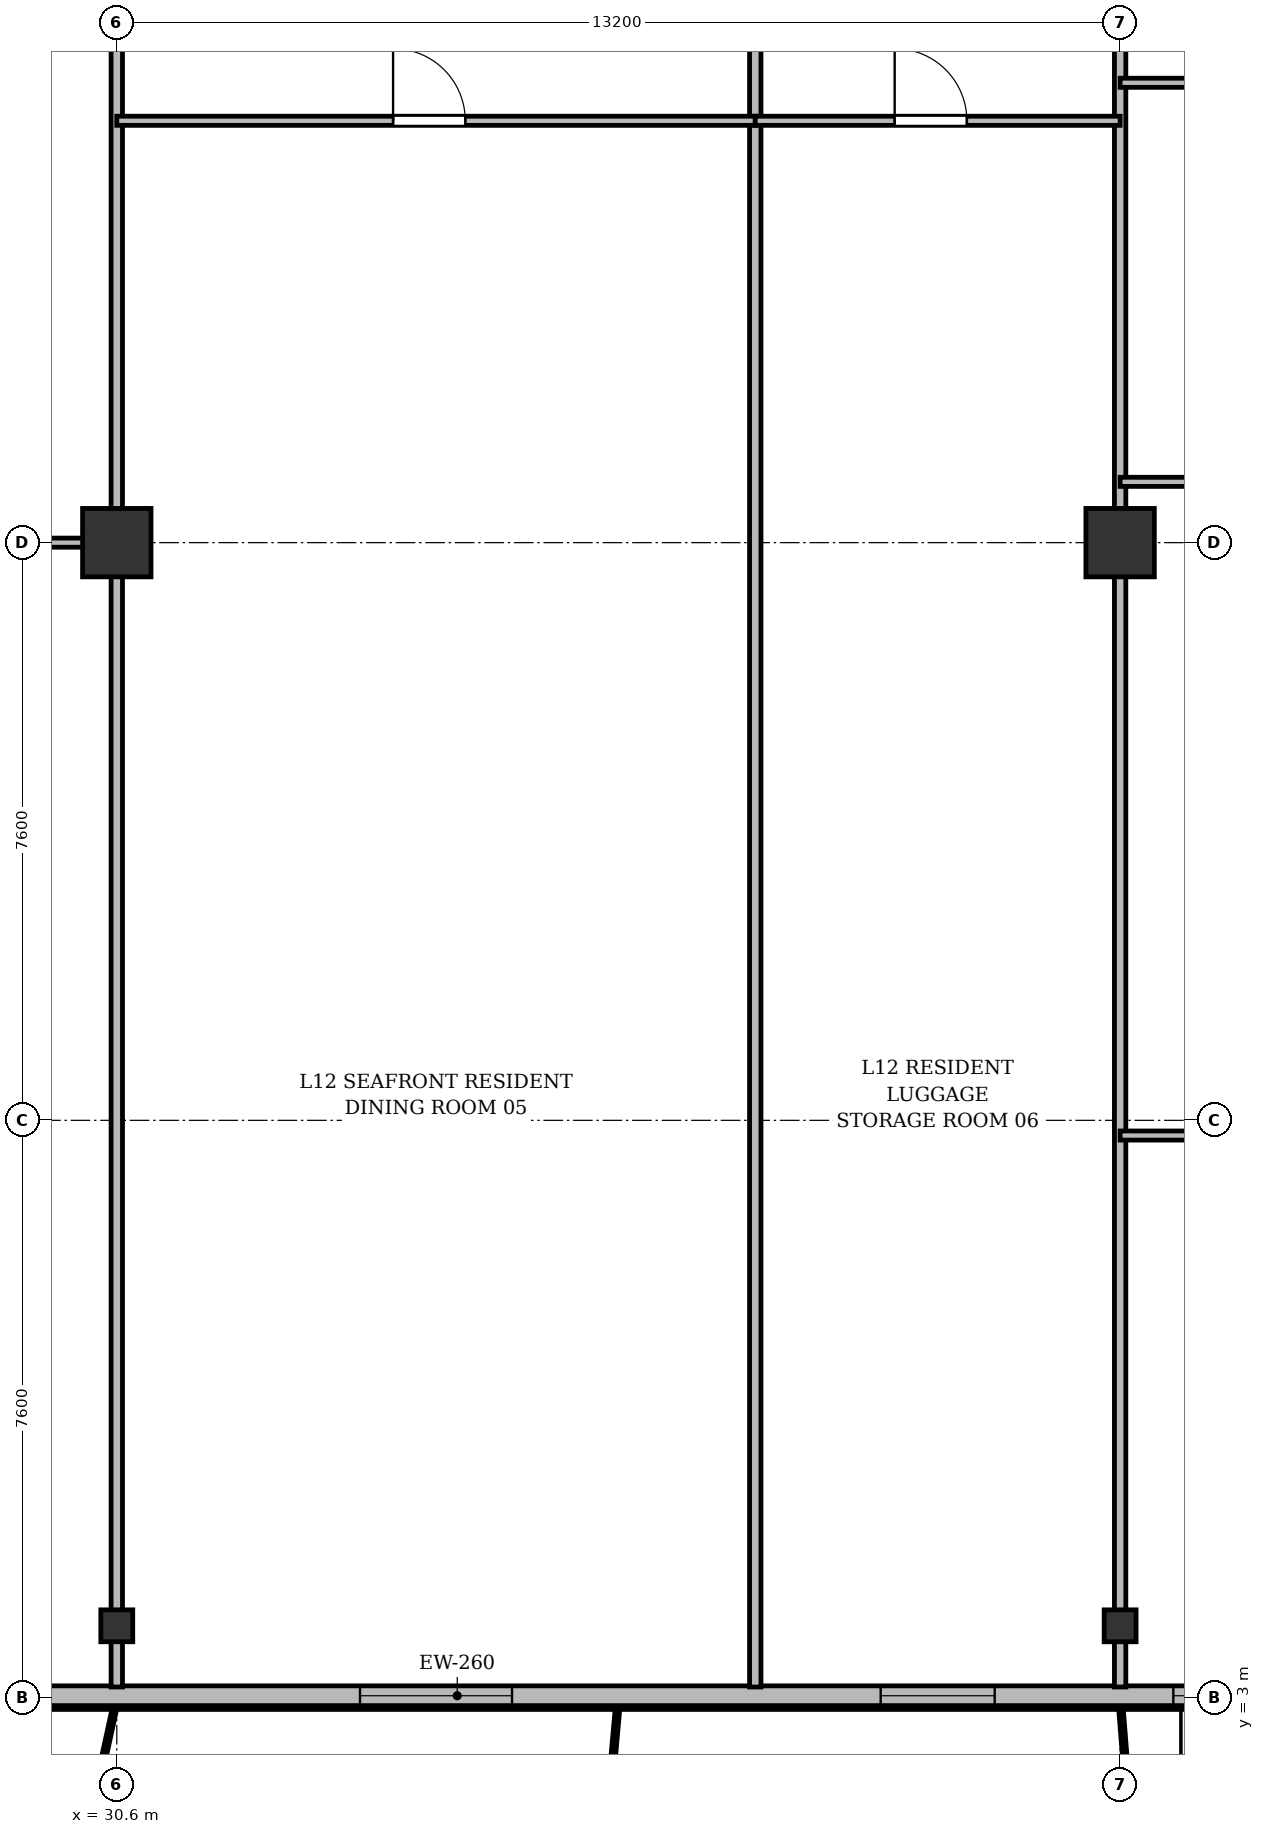
"""IFC4 building model, lengths in metres.
Left out: names, types, materials, properties, quantities, classifications, styles, units other than length and angle.
Written with IfcOpenShell. Run it as: python <this file> out.ifc"""

import sys

from ifc_helpers import new_model, si_unit, direction, frame, frame_2d, origin, origin_2d, place, context, subcontext, project, spatial, rectangle, i_section, extrude, source, transform, mapped, element, fill, save


model = new_model("IFC4")
c1 = context("Model", 3, precision=1e-05, world=origin(), true_north=direction((0.0, 1.0)))
c2 = subcontext(c1, "Body", "Model", "MODEL_VIEW")
j1 = project(units=[si_unit("LENGTHUNIT", "METRE"), si_unit("PLANEANGLEUNIT", "RADIAN")], contexts=[c1])
p1 = place(None, origin())
s1 = spatial("IfcSite", under=j1, at=p1, CompositionType="ELEMENT")
p2 = place(p1, origin())
s2 = spatial("IfcBuilding", under=s1, at=p2, CompositionType="ELEMENT")
p3 = place(p2, frame((0.0, 0.0, 48.7)))
s3 = spatial("IfcBuildingStorey", under=s2, at=p3, CompositionType="ELEMENT", Elevation=48.7)
m1 = source(origin(), c2, "Body", "SweptSolid", [
    extrude(i_section(OverallWidth=0.42, OverallDepth=0.42, WebThickness=0.026, FlangeThickness=0.04, at=origin_2d()), origin(), (0.0, 0.0, 1.0), 3.6),
])
p4 = place(p3, frame((30.6, 3.95, 0.0), z_axis=(0.0, 0.0, 1.0), x_axis=(1.0, 0.0, 0.0)))
e1 = element("IfcColumn", 1, at=p4, inside=s3, PredefinedType="COLUMN", context=c2, shape_type="MappedRepresentation", body=[
    mapped(m1, transform((0.0, 0.0, 0.0), x_axis=(1.0, 0.0, 0.0), y_axis=(0.0, 1.0, 0.0), z_axis=(0.0, 0.0, 1.0), scale=1.0)),
])
m2 = source(origin(), c2, "Body", "SweptSolid", [
    extrude(rectangle(XDim=0.9, YDim=0.9, at=origin_2d()), origin(), (0.0, 0.0, 1.0), 3.6),
])
p5 = place(p3, frame((30.6, 18.2, 0.0), z_axis=(0.0, 0.0, 1.0), x_axis=(1.0, 0.0, 0.0)))
e2 = element("IfcColumn", 2, at=p5, inside=s3, PredefinedType="COLUMN", context=c2, shape_type="MappedRepresentation", body=[
    mapped(m2, transform((0.0, 0.0, 0.0), x_axis=(1.0, 0.0, 0.0), y_axis=(0.0, 1.0, 0.0), z_axis=(0.0, 0.0, 1.0), scale=1.0)),
])
p6 = place(p3, frame((43.8, 3.95, 0.0), z_axis=(0.0, 0.0, 1.0), x_axis=(1.0, 0.0, 0.0)))
e3 = element("IfcColumn", 3, at=p6, inside=s3, PredefinedType="COLUMN", context=c2, shape_type="MappedRepresentation", body=[
    mapped(m1, transform((0.0, 0.0, 0.0), x_axis=(1.0, 0.0, 0.0), y_axis=(0.0, 1.0, 0.0), z_axis=(0.0, 0.0, 1.0), scale=1.0)),
])
p7 = place(p3, frame((43.8, 18.2, 0.0), z_axis=(0.0, 0.0, 1.0), x_axis=(1.0, 0.0, 0.0)))
e4 = element("IfcColumn", 4, at=p7, inside=s3, PredefinedType="COLUMN", context=c2, shape_type="MappedRepresentation", body=[
    mapped(m2, transform((0.0, 0.0, 0.0), x_axis=(1.0, 0.0, 0.0), y_axis=(0.0, 1.0, 0.0), z_axis=(0.0, 0.0, 1.0), scale=1.0)),
])
p8 = place(p3, frame((66.9, 3.03, 0.0), z_axis=(0.0, 0.0, 1.0), x_axis=(-1.0, 0.0, 0.0)))
e5 = element("IfcWall", 5, at=p8, inside=s3, PredefinedType="SOLIDWALL", context=c2, shape_type="SweptSolid", body=[
    extrude(rectangle(XDim=59.4, YDim=0.26, at=frame_2d((29.7, 0.0))), origin(), (0.0, 0.0, 1.0), 3.34),
])
p9 = place(p8, frame((0.745, 0.0, 0.9)))
e6 = element("IfcOpeningElement", 6, at=p9, cuts=e5, PredefinedType="OPENING", context=c2, shape_type="SweptSolid", body=[
    extrude(rectangle(XDim=1.5, YDim=1.75, at=frame_2d((0.75, 0.875))), frame((0.0, 0.14, 0.0), z_axis=(0.0, -1.0, 0.0), x_axis=(1.0, 0.0, 0.0)), (0.0, 0.0, 1.0), 0.28),
])
p10 = place(p8, frame((4.5, 0.0, 0.9)))
e7 = element("IfcOpeningElement", 7, at=p10, cuts=e5, PredefinedType="OPENING", context=c2, shape_type="SweptSolid", body=[
    extrude(rectangle(XDim=2.0, YDim=1.95, at=frame_2d((1.0, 0.975))), frame((0.0, 0.14, 0.0), z_axis=(0.0, -1.0, 0.0), x_axis=(1.0, 0.0, 0.0)), (0.0, 0.0, 1.0), 0.28),
])
p11 = place(p8, frame((11.175, 0.0, 0.9)))
e8 = element("IfcOpeningElement", 8, at=p11, cuts=e5, PredefinedType="OPENING", context=c2, shape_type="SweptSolid", body=[
    extrude(rectangle(XDim=1.65, YDim=1.85, at=frame_2d((0.825, 0.925))), frame((0.0, 0.14, 0.0), z_axis=(0.0, -1.0, 0.0), x_axis=(1.0, 0.0, 0.0)), (0.0, 0.0, 1.0), 0.28),
])
p12 = place(p8, frame((17.007, 0.0, 0.0)))
e9 = element("IfcOpeningElement", 9, at=p12, cuts=e5, PredefinedType="OPENING", context=c2, shape_type="SweptSolid", body=[
    extrude(rectangle(XDim=1.2, YDim=2.2, at=frame_2d((0.6, 1.1))), frame((0.0, 0.14, 0.0), z_axis=(0.0, -1.0, 0.0), x_axis=(1.0, 0.0, 0.0)), (0.0, 0.0, 1.0), 0.28),
])
p13 = place(p8, frame((20.2, 0.0, 0.9)))
e10 = element("IfcOpeningElement", 10, at=p13, cuts=e5, PredefinedType="OPENING", context=c2, shape_type="SweptSolid", body=[
    extrude(rectangle(XDim=2.2, YDim=1.8, at=frame_2d((1.1, 0.9))), frame((0.0, 0.14, 0.0), z_axis=(0.0, -1.0, 0.0), x_axis=(1.0, 0.0, 0.0)), (0.0, 0.0, 1.0), 0.28),
])
p14 = place(p8, frame((24.75, 0.0, 0.9)))
e11 = element("IfcOpeningElement", 11, at=p14, cuts=e5, PredefinedType="OPENING", context=c2, shape_type="SweptSolid", body=[
    extrude(rectangle(XDim=1.5, YDim=1.75, at=frame_2d((0.75, 0.875))), frame((0.0, 0.14, 0.0), z_axis=(0.0, -1.0, 0.0), x_axis=(1.0, 0.0, 0.0)), (0.0, 0.0, 1.0), 0.28),
])
p15 = place(p8, frame((31.1, 0.0, 0.9)))
e12 = element("IfcOpeningElement", 12, at=p15, cuts=e5, PredefinedType="OPENING", context=c2, shape_type="SweptSolid", body=[
    extrude(rectangle(XDim=2.0, YDim=1.95, at=frame_2d((1.0, 0.975))), frame((0.0, 0.14, 0.0), z_axis=(0.0, -1.0, 0.0), x_axis=(1.0, 0.0, 0.0)), (0.0, 0.0, 1.0), 0.28),
])
p16 = place(p8, frame((39.075, 0.0, 0.9)))
e13 = element("IfcOpeningElement", 13, at=p16, cuts=e5, PredefinedType="OPENING", context=c2, shape_type="SweptSolid", body=[
    extrude(rectangle(XDim=1.65, YDim=1.85, at=frame_2d((0.825, 0.925))), frame((0.0, 0.14, 0.0), z_axis=(0.0, -1.0, 0.0), x_axis=(1.0, 0.0, 0.0)), (0.0, 0.0, 1.0), 0.28),
])
p17 = place(p8, frame((45.435, 0.0, 0.0)))
e14 = element("IfcOpeningElement", 14, at=p17, cuts=e5, PredefinedType="OPENING", context=c2, shape_type="SweptSolid", body=[
    extrude(rectangle(XDim=1.2, YDim=2.2, at=frame_2d((0.6, 1.1))), frame((0.0, 0.14, 0.0), z_axis=(0.0, -1.0, 0.0), x_axis=(1.0, 0.0, 0.0)), (0.0, 0.0, 1.0), 0.28),
])
p18 = place(p8, frame((48.25, 0.0, 0.9)))
e15 = element("IfcOpeningElement", 15, at=p18, cuts=e5, PredefinedType="OPENING", context=c2, shape_type="SweptSolid", body=[
    extrude(rectangle(XDim=2.2, YDim=1.8, at=frame_2d((1.1, 0.9))), frame((0.0, 0.14, 0.0), z_axis=(0.0, -1.0, 0.0), x_axis=(1.0, 0.0, 0.0)), (0.0, 0.0, 1.0), 0.28),
])
p19 = place(p8, frame((52.35, 0.0, 0.9)))
e16 = element("IfcOpeningElement", 16, at=p19, cuts=e5, PredefinedType="OPENING", context=c2, shape_type="SweptSolid", body=[
    extrude(rectangle(XDim=1.5, YDim=1.75, at=frame_2d((0.75, 0.875))), frame((0.0, 0.14, 0.0), z_axis=(0.0, -1.0, 0.0), x_axis=(1.0, 0.0, 0.0)), (0.0, 0.0, 1.0), 0.28),
])
p20 = place(p8, frame((56.105, 0.0, 0.9)))
e17 = element("IfcOpeningElement", 17, at=p20, cuts=e5, PredefinedType="OPENING", context=c2, shape_type="SweptSolid", body=[
    extrude(rectangle(XDim=2.0, YDim=1.95, at=frame_2d((1.0, 0.975))), frame((0.0, 0.14, 0.0), z_axis=(0.0, -1.0, 0.0), x_axis=(1.0, 0.0, 0.0)), (0.0, 0.0, 1.0), 0.28),
])
p21 = place(p3, frame((30.6, 3.145, 0.0), z_axis=(0.0, 0.0, 1.0), x_axis=(0.0, 1.0, 0.0)))
e18 = element("IfcWall", 18, at=p21, inside=s3, PredefinedType="PARTITIONING", context=c2, shape_type="SweptSolid", body=[
    extrude(rectangle(XDim=24.455, YDim=0.15, at=frame_2d((12.228, 0.0))), origin(), (0.0, 0.0, 1.0), 2.752),
])
p22 = place(p3, frame((39.0, 3.145, 0.0), z_axis=(0.0, 0.0, 1.0), x_axis=(0.0, 1.0, 0.0)))
e19 = element("IfcWall", 19, at=p22, inside=s3, PredefinedType="PARTITIONING", context=c2, shape_type="SweptSolid", body=[
    extrude(rectangle(XDim=24.455, YDim=0.15, at=frame_2d((12.228, 0.0))), origin(), (0.0, 0.0, 1.0), 2.69),
])
p23 = place(p3, frame((43.8, 3.145, 0.0), z_axis=(0.0, 0.0, 1.0), x_axis=(0.0, 1.0, 0.0)))
e20 = element("IfcWall", 20, at=p23, inside=s3, PredefinedType="PARTITIONING", context=c2, shape_type="SweptSolid", body=[
    extrude(rectangle(XDim=24.455, YDim=0.15, at=frame_2d((12.228, 0.0))), origin(), (0.0, 0.0, 1.0), 2.752),
])
p24 = place(p3, frame((23.4, 18.2, 0.0), z_axis=(0.0, 0.0, 1.0), x_axis=(1.0, 0.0, 0.0)))
e21 = element("IfcWall", 21, at=p24, inside=s3, PredefinedType="PARTITIONING", context=c2, shape_type="SweptSolid", body=[
    extrude(rectangle(XDim=7.2, YDim=0.12, at=frame_2d((3.6, 0.0))), origin(), (0.0, 0.0, 1.0), 2.69),
])
p25 = place(p24, frame((3.125, 0.0, 0.0)))
e22 = element("IfcOpeningElement", 22, at=p25, cuts=e21, PredefinedType="OPENING", context=c2, shape_type="SweptSolid", body=[
    extrude(rectangle(XDim=0.95, YDim=2.15, at=frame_2d((0.475, 1.075))), frame((0.0, 0.07, 0.0), z_axis=(0.0, -1.0, 0.0), x_axis=(1.0, 0.0, 0.0)), (0.0, 0.0, 1.0), 0.14),
])
p26 = place(p3, frame((30.6, 23.75, 0.0), z_axis=(0.0, 0.0, 1.0), x_axis=(1.0, 0.0, 0.0)))
e23 = element("IfcWall", 23, at=p26, inside=s3, PredefinedType="PARTITIONING", context=c2, shape_type="SweptSolid", body=[
    extrude(rectangle(XDim=8.4, YDim=0.12, at=frame_2d((4.2, 0.0))), origin(), (0.0, 0.0, 1.0), 2.752),
])
p27 = place(p26, frame((3.635, 0.0, 0.0)))
e24 = element("IfcOpeningElement", 24, at=p27, cuts=e23, PredefinedType="OPENING", context=c2, shape_type="SweptSolid", body=[
    extrude(rectangle(XDim=0.95, YDim=2.15, at=frame_2d((0.475, 1.075))), frame((0.0, 0.07, 0.0), z_axis=(0.0, -1.0, 0.0), x_axis=(1.0, 0.0, 0.0)), (0.0, 0.0, 1.0), 0.14),
])
p28 = place(p3, frame((39.0, 23.75, 0.0), z_axis=(0.0, 0.0, 1.0), x_axis=(1.0, 0.0, 0.0)))
e25 = element("IfcWall", 25, at=p28, inside=s3, PredefinedType="PARTITIONING", context=c2, shape_type="SweptSolid", body=[
    extrude(rectangle(XDim=4.8, YDim=0.12, at=frame_2d((2.4, 0.0))), origin(), (0.0, 0.0, 1.0), 2.752),
])
p29 = place(p28, frame((1.834, 0.0, 0.0)))
e26 = element("IfcOpeningElement", 26, at=p29, cuts=e25, PredefinedType="OPENING", context=c2, shape_type="SweptSolid", body=[
    extrude(rectangle(XDim=0.95, YDim=2.15, at=frame_2d((0.475, 1.075))), frame((0.0, 0.07, 0.0), z_axis=(0.0, -1.0, 0.0), x_axis=(1.0, 0.0, 0.0)), (0.0, 0.0, 1.0), 0.14),
])
p30 = place(p3, frame((43.8, 19.0, 0.0), z_axis=(0.0, 0.0, 1.0), x_axis=(1.0, 0.0, 0.0)))
e27 = element("IfcWall", 27, at=p30, inside=s3, PredefinedType="PARTITIONING", context=c2, shape_type="SweptSolid", body=[
    extrude(rectangle(XDim=7.2, YDim=0.12, at=frame_2d((3.6, 0.0))), origin(), (0.0, 0.0, 1.0), 2.752),
])
p31 = place(p30, frame((3.125, 0.0, 0.0)))
e28 = element("IfcOpeningElement", 28, at=p31, cuts=e27, PredefinedType="OPENING", context=c2, shape_type="SweptSolid", body=[
    extrude(rectangle(XDim=0.95, YDim=2.15, at=frame_2d((0.475, 1.075))), frame((0.0, 0.07, 0.0), z_axis=(0.0, -1.0, 0.0), x_axis=(1.0, 0.0, 0.0)), (0.0, 0.0, 1.0), 0.14),
])
p32 = place(p3, frame((43.8, 24.25, 0.0), z_axis=(0.0, 0.0, 1.0), x_axis=(1.0, 0.0, 0.0)))
e29 = element("IfcWall", 29, at=p32, inside=s3, PredefinedType="PARTITIONING", context=c2, shape_type="SweptSolid", body=[
    extrude(rectangle(XDim=2.4, YDim=0.12, at=frame_2d((1.2, 0.0))), origin(), (0.0, 0.0, 1.0), 2.752),
])
p33 = place(p3, frame((43.8, 10.4, 0.0), z_axis=(0.0, 0.0, 1.0), x_axis=(1.0, 0.0, 0.0)))
e30 = element("IfcWall", 30, at=p33, inside=s3, PredefinedType="PARTITIONING", context=c2, shape_type="SweptSolid", body=[
    extrude(rectangle(XDim=3.6, YDim=0.12, at=frame_2d((1.8, 0.0))), origin(), (0.0, 0.0, 1.0), 2.752),
])
p34 = place(p33, frame((1.325, 0.0, 0.0)))
e31 = element("IfcOpeningElement", 31, at=p34, cuts=e30, PredefinedType="OPENING", context=c2, shape_type="SweptSolid", body=[
    extrude(rectangle(XDim=0.95, YDim=2.15, at=frame_2d((0.475, 1.075))), frame((0.0, 0.07, 0.0), z_axis=(0.0, -1.0, 0.0), x_axis=(1.0, 0.0, 0.0)), (0.0, 0.0, 1.0), 0.14),
])
m3 = source(origin(), c2, "Body", "SweptSolid", [
    extrude(rectangle(XDim=2.2, YDim=1.8, at=frame_2d((1.1, 0.9))), frame((0.0, 0.03, 0.0), z_axis=(0.0, -1.0, 0.0), x_axis=(1.0, 0.0, 0.0)), (0.0, 0.0, 1.0), 0.06),
])
p35 = place(p13, origin())
e32 = element("IfcWindow", 32, at=p35, inside=s3, PartitioningType="SINGLE_PANEL", PredefinedType="WINDOW", context=c2, shape_type="MappedRepresentation", body=[
    mapped(m3, transform((0.0, 0.0, 0.0), x_axis=(1.0, 0.0, 0.0), y_axis=(0.0, 1.0, 0.0), z_axis=(0.0, 0.0, 1.0), scale=1.0)),
])
fill(e10, e32)
m4 = source(origin(), c2, "Body", "SweptSolid", [
    extrude(rectangle(XDim=1.5, YDim=1.75, at=frame_2d((0.75, 0.875))), frame((0.0, 0.03, 0.0), z_axis=(0.0, -1.0, 0.0), x_axis=(1.0, 0.0, 0.0)), (0.0, 0.0, 1.0), 0.06),
])
p36 = place(p14, origin())
e33 = element("IfcWindow", 33, at=p36, inside=s3, PartitioningType="SINGLE_PANEL", PredefinedType="WINDOW", context=c2, shape_type="MappedRepresentation", body=[
    mapped(m4, transform((0.0, 0.0, 0.0), x_axis=(1.0, 0.0, 0.0), y_axis=(0.0, 1.0, 0.0), z_axis=(0.0, 0.0, 1.0), scale=1.0)),
])
fill(e11, e33)
m5 = source(origin(), c2, "Body", "SweptSolid", [
    extrude(rectangle(XDim=2.0, YDim=1.95, at=frame_2d((1.0, 0.975))), frame((0.0, 0.03, 0.0), z_axis=(0.0, -1.0, 0.0), x_axis=(1.0, 0.0, 0.0)), (0.0, 0.0, 1.0), 0.06),
])
p37 = place(p15, origin())
e34 = element("IfcWindow", 34, at=p37, inside=s3, PartitioningType="SINGLE_PANEL", PredefinedType="WINDOW", context=c2, shape_type="MappedRepresentation", body=[
    mapped(m5, transform((0.0, 0.0, 0.0), x_axis=(1.0, 0.0, 0.0), y_axis=(0.0, 1.0, 0.0), z_axis=(0.0, 0.0, 1.0), scale=1.0)),
])
fill(e12, e34)
m6 = source(origin(), c2, "Body", "SweptSolid", [
    extrude(rectangle(XDim=0.95, YDim=2.15, at=frame_2d((0.475, 1.075))), frame((0.0, 0.025, 0.0), z_axis=(0.0, -1.0, 0.0), x_axis=(1.0, 0.0, 0.0)), (0.0, 0.0, 1.0), 0.05),
])
p38 = place(p27, origin())
e35 = element("IfcDoor", 35, at=p38, inside=s3, OperationType="SINGLE_SWING_LEFT", PredefinedType="DOOR", context=c2, shape_type="MappedRepresentation", body=[
    mapped(m6, transform((0.0, 0.0, 0.0), x_axis=(1.0, 0.0, 0.0), y_axis=(0.0, 1.0, 0.0), z_axis=(0.0, 0.0, 1.0), scale=1.0)),
])
fill(e24, e35)
p39 = place(p29, origin())
e36 = element("IfcDoor", 36, at=p39, inside=s3, OperationType="SINGLE_SWING_LEFT", PredefinedType="DOOR", context=c2, shape_type="MappedRepresentation", body=[
    mapped(m6, transform((0.0, 0.0, 0.0), x_axis=(1.0, 0.0, 0.0), y_axis=(0.0, 1.0, 0.0), z_axis=(0.0, 0.0, 1.0), scale=1.0)),
])
fill(e26, e36)
save(model, sys.argv[1])
